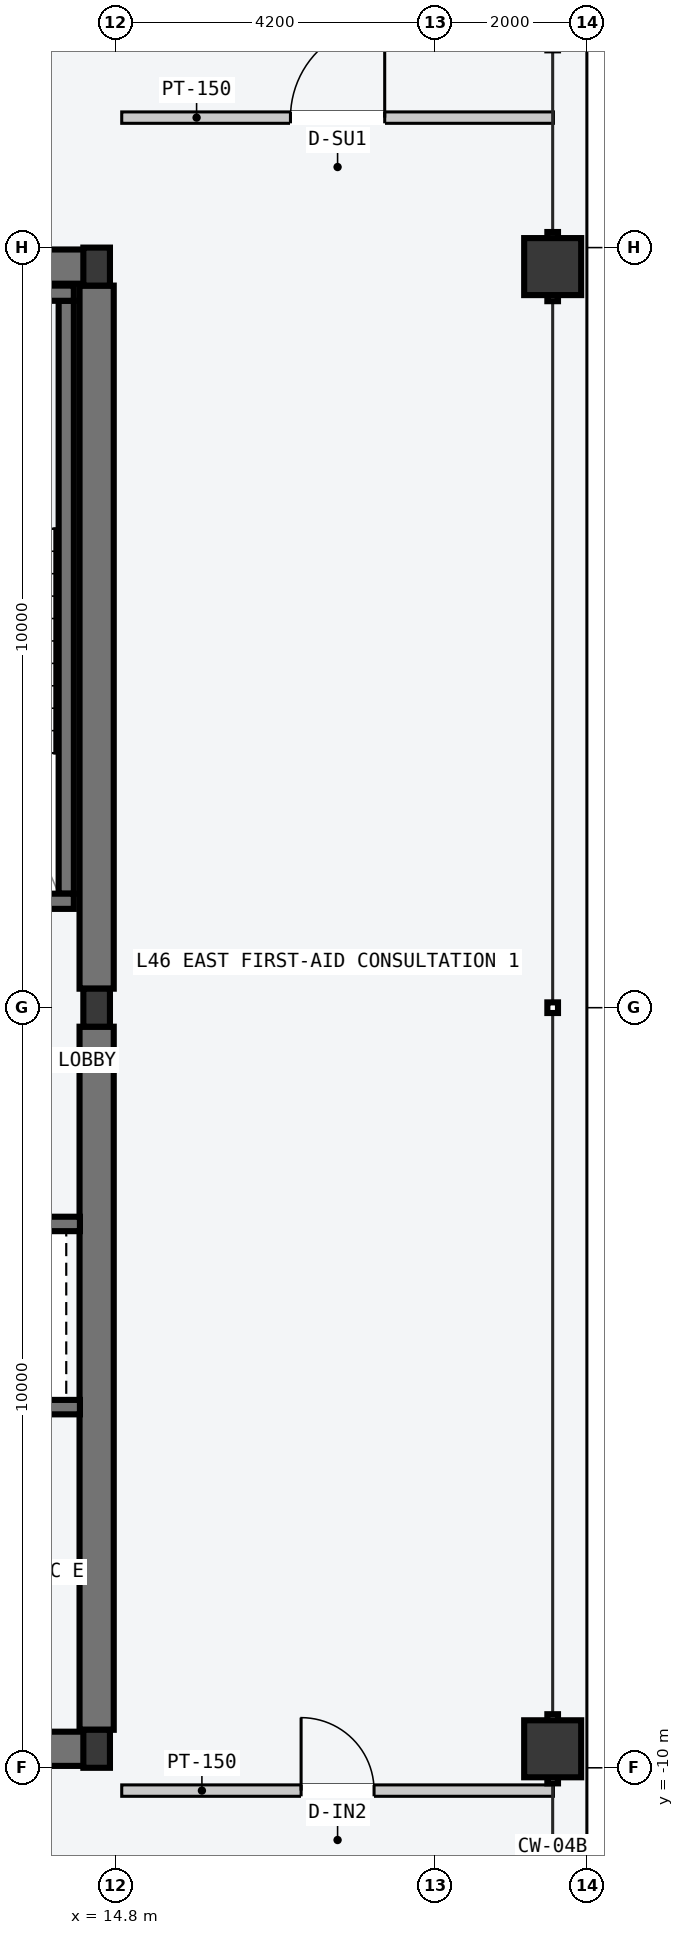
"""IFC4 building model, lengths in metres.
Left out: names, types, materials, properties, quantities, classifications, styles, units other than length and angle.
Written with IfcOpenShell. Run it as: python <this file> out.ifc"""

import sys

from ifc_helpers import new_model, si_unit, direction, frame, frame_2d, origin, origin_2d, place, context, subcontext, project, spatial, rectangle, hollow_rectangle, i_section, extrude, element, fill, save


model = new_model("IFC4")
c1 = context("Model", 3, precision=1e-05, world=origin(), true_north=direction((0.0, 1.0)))
c2 = subcontext(c1, "Body", "Model", "MODEL_VIEW")
j1 = project(units=[si_unit("LENGTHUNIT", "METRE"), si_unit("PLANEANGLEUNIT", "RADIAN")], contexts=[c1])
p1 = place(None, origin())
s1 = spatial("IfcSite", under=j1, at=p1, CompositionType="ELEMENT")
p2 = place(p1, origin())
s2 = spatial("IfcBuilding", under=s1, at=p2, CompositionType="ELEMENT")
p3 = place(p2, frame((0.0, 0.0, 176.7)))
s3 = spatial("IfcBuildingStorey", under=s2, at=p3, CompositionType="ELEMENT", Elevation=176.7)
for number, where, z_axis, x_axis in (
    (1, (8.07, -9.75, -0.2), (0.0, 0.0, 1.0), (1.0, 0.0, 0.0)),
    (2, (8.07, 9.75, -0.2), (0.0, 0.0, 1.0), (1.0, 0.0, 0.0)),
):
    element("IfcWall", number, at=place(p3, frame(where, z_axis=z_axis, x_axis=x_axis)), inside=s3, PredefinedType="SHEAR", context=c2, shape_type="SweptSolid", body=[
        extrude(rectangle(XDim=6.46, YDim=0.45, at=frame_2d((3.23, 0.0))), origin(), (0.0, 0.0, 1.0), 3.6),
    ])
for number, where, z_axis, x_axis in (
    (3, (14.55, -9.5, -0.2), (0.0, 0.0, 1.0), (0.0, 1.0, 0.0)),
    (4, (14.55, 0.25, -0.2), (0.0, 0.0, 1.0), (0.0, 1.0, 0.0)),
):
    element("IfcWall", number, at=place(p3, frame(where, z_axis=z_axis, x_axis=x_axis)), inside=s3, PredefinedType="SHEAR", context=c2, shape_type="SweptSolid", body=[
        extrude(rectangle(XDim=9.25, YDim=0.45, at=frame_2d((4.625, 0.0))), origin(), (0.0, 0.0, 1.0), 3.6),
    ])
p4 = place(p3, frame((14.15, 1.5, -0.2), z_axis=(0.0, 0.0, 1.0), x_axis=(0.0, 1.0, 0.0)))
e5 = element("IfcWall", 5, at=p4, inside=s3, PredefinedType="SOLIDWALL", context=c2, shape_type="SweptSolid", body=[
    extrude(rectangle(XDim=7.8, YDim=0.2, at=frame_2d((3.9, 0.0))), origin(), (0.0, 0.0, 1.0), 3.6),
])
p5 = place(p3, frame((10.53, 1.4, -0.2), z_axis=(0.0, 0.0, 1.0), x_axis=(1.0, 0.0, 0.0)))
e6 = element("IfcWall", 6, at=p5, inside=s3, PredefinedType="SOLIDWALL", context=c2, shape_type="SweptSolid", body=[
    extrude(rectangle(XDim=3.72, YDim=0.2, at=frame_2d((1.86, 0.0))), origin(), (0.0, 0.0, 1.0), 3.6),
])
p6 = place(p5, frame((1.5, 0.0, 0.2)))
e7 = element("IfcOpeningElement", 7, at=p6, cuts=e6, PredefinedType="OPENING", context=c2, shape_type="SweptSolid", body=[
    extrude(rectangle(XDim=1.12, YDim=2.18, at=frame_2d((0.56, 1.09))), frame((0.0, 0.11, 0.0), z_axis=(0.0, -1.0, 0.0), x_axis=(1.0, 0.0, 0.0)), (0.0, 0.0, 1.0), 0.22),
])
p7 = place(p3, frame((10.53, 9.4, -0.2), z_axis=(0.0, 0.0, 1.0), x_axis=(1.0, 0.0, 0.0)))
e8 = element("IfcWall", 8, at=p7, inside=s3, PredefinedType="SOLIDWALL", context=c2, shape_type="SweptSolid", body=[
    extrude(rectangle(XDim=3.72, YDim=0.2, at=frame_2d((1.86, 0.0))), origin(), (0.0, 0.0, 1.0), 3.6),
])
for number, where, z_axis, x_axis in (
    (9, (14.55, -9.75, 0.0), (0.0, 0.0, 1.0), (1.0, 0.0, 0.0)),
    (10, (14.55, 0.0, 0.0), (0.0, 0.0, 1.0), (1.0, 0.0, 0.0)),
    (11, (14.55, 9.75, 0.0), (0.0, 0.0, 1.0), (1.0, 0.0, 0.0)),
):
    element("IfcColumn", number, at=place(p3, frame(where, z_axis=z_axis, x_axis=x_axis)), inside=s3, PredefinedType="COLUMN", context=c2, shape_type="SweptSolid", body=[
        extrude(i_section(OverallWidth=0.35, OverallDepth=0.5, WebThickness=0.02, FlangeThickness=0.032, at=origin_2d()), origin(), (0.0, 0.0, 1.0), 3.6),
    ])
for number, where, z_axis, x_axis in (
    (12, (20.55, -9.75, 0.0), (0.0, 0.0, 1.0), (0.0, 1.0, 0.0)),
    (13, (20.55, 9.75, 0.0), (0.0, 0.0, 1.0), (0.0, 1.0, 0.0)),
):
    element("IfcColumn", number, at=place(p3, frame(where, z_axis=z_axis, x_axis=x_axis)), inside=s3, PredefinedType="COLUMN", context=c2, shape_type="SweptSolid", body=[
        extrude(hollow_rectangle(XDim=0.75, YDim=0.75, WallThickness=0.032, at=origin_2d()), origin(), (0.0, 0.0, 1.0), 3.6),
    ])
p8 = place(p3, frame((11.65, -2.845, -0.2), z_axis=(0.0, 0.0, 1.0), x_axis=(1.0, 0.0, 0.0)))
e14 = element("IfcWall", 14, at=p8, inside=s3, PredefinedType="SOLIDWALL", context=c2, shape_type="SweptSolid", body=[
    extrude(rectangle(XDim=2.68, YDim=0.19, at=frame_2d((1.34, 0.0))), origin(), (0.0, 0.0, 1.0), 3.6),
])
p9 = place(p8, frame((0.65, 0.0, 0.2)))
e15 = element("IfcOpeningElement", 15, at=p9, cuts=e14, PredefinedType="OPENING", context=c2, shape_type="SweptSolid", body=[
    extrude(rectangle(XDim=1.2, YDim=2.2, at=frame_2d((0.6, 1.1))), frame((0.0, 0.105, 0.0), z_axis=(0.0, -1.0, 0.0), x_axis=(1.0, 0.0, 0.0)), (0.0, 0.0, 1.0), 0.21),
])
p10 = place(p3, frame((11.65, -5.255, -0.2), z_axis=(0.0, 0.0, 1.0), x_axis=(1.0, 0.0, 0.0)))
e16 = element("IfcWall", 16, at=p10, inside=s3, PredefinedType="SOLIDWALL", context=c2, shape_type="SweptSolid", body=[
    extrude(rectangle(XDim=2.68, YDim=0.19, at=frame_2d((1.34, 0.0))), origin(), (0.0, 0.0, 1.0), 3.6),
])
p11 = place(p3, frame((14.88, 11.71, 0.0), z_axis=(0.0, 0.0, 1.0), x_axis=(1.0, 0.0, 0.0)))
e17 = element("IfcWall", 17, at=p11, inside=s3, PredefinedType="PARTITIONING", context=c2, shape_type="SweptSolid", body=[
    extrude(rectangle(XDim=5.68, YDim=0.15, at=frame_2d((2.84, 0.0))), origin(), (0.0, 0.0, 1.0), 3.4),
])
p12 = place(p11, frame((2.22, 0.0, 0.0)))
e18 = element("IfcOpeningElement", 18, at=p12, cuts=e17, PredefinedType="OPENING", context=c2, shape_type="SweptSolid", body=[
    extrude(rectangle(XDim=1.24, YDim=2.24, at=frame_2d((0.62, 1.12))), frame((0.0, 0.085, 0.0), z_axis=(0.0, -1.0, 0.0), x_axis=(1.0, 0.0, 0.0)), (0.0, 0.0, 1.0), 0.17),
])
p13 = place(p3, frame((14.88, -10.3, 0.0), z_axis=(0.0, 0.0, 1.0), x_axis=(1.0, 0.0, 0.0)))
e19 = element("IfcWall", 19, at=p13, inside=s3, PredefinedType="PARTITIONING", context=c2, shape_type="SweptSolid", body=[
    extrude(rectangle(XDim=5.68, YDim=0.15, at=frame_2d((2.84, 0.0))), origin(), (0.0, 0.0, 1.0), 3.4),
])
p14 = place(p13, frame((2.36, 0.0, 0.0)))
e20 = element("IfcOpeningElement", 20, at=p14, cuts=e19, PredefinedType="OPENING", context=c2, shape_type="SweptSolid", body=[
    extrude(rectangle(XDim=0.96, YDim=2.18, at=frame_2d((0.48, 1.09))), frame((0.0, 0.085, 0.0), z_axis=(0.0, -1.0, 0.0), x_axis=(1.0, 0.0, 0.0)), (0.0, 0.0, 1.0), 0.17),
])
p15 = place(p12, origin())
e21 = element("IfcDoor", 21, at=p15, inside=s3, OperationType="SINGLE_SWING_RIGHT", PredefinedType="DOOR", context=c2, shape_type="SweptSolid", body=[
    extrude(rectangle(XDim=1.24, YDim=2.24, at=frame_2d((0.62, 1.12))), frame((0.0, 0.025, 0.0), z_axis=(0.0, -1.0, 0.0), x_axis=(1.0, 0.0, 0.0)), (0.0, 0.0, 1.0), 0.05),
])
fill(e18, e21)
p16 = place(p14, origin())
e22 = element("IfcDoor", 22, at=p16, inside=s3, OperationType="SINGLE_SWING_LEFT", PredefinedType="DOOR", context=c2, shape_type="SweptSolid", body=[
    extrude(rectangle(XDim=0.96, YDim=2.18, at=frame_2d((0.48, 1.09))), frame((0.0, 0.025, 0.0), z_axis=(0.0, -1.0, 0.0), x_axis=(1.0, 0.0, 0.0)), (0.0, 0.0, 1.0), 0.05),
])
fill(e20, e22)
save(model, sys.argv[1])
